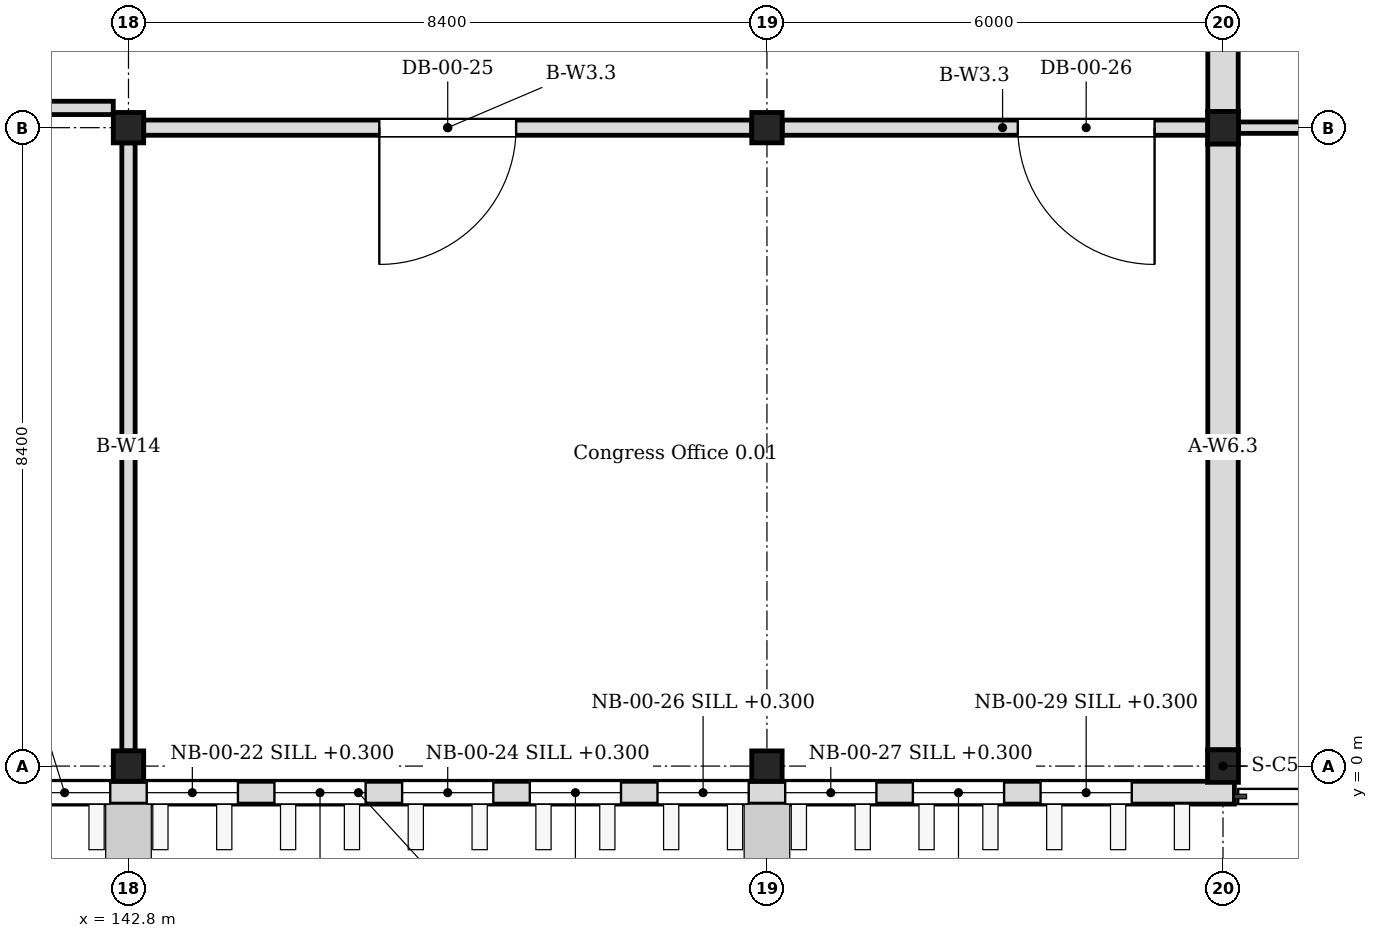
"""IFC4 building model, lengths in metres.
Left out: names, types, materials, properties, quantities, classifications, styles, units other than length and angle.
Written with IfcOpenShell. Run it as: python <this file> out.ifc"""

import sys

from ifc_helpers import new_model, si_unit, direction, frame, frame_2d, origin, origin_2d, place, context, subcontext, project, spatial, rectangle, i_section, extrude, element, fill, save


model = new_model("IFC4")
c1 = context("Model", 3, precision=1e-05, world=origin(), true_north=direction((0.0, 1.0)))
c2 = subcontext(c1, "Body", "Model", "MODEL_VIEW")
j1 = project(units=[si_unit("LENGTHUNIT", "METRE"), si_unit("PLANEANGLEUNIT", "RADIAN")], contexts=[c1])
p1 = place(None, origin())
s1 = spatial("IfcSite", under=j1, at=p1, CompositionType="ELEMENT")
p2 = place(p1, origin())
s2 = spatial("IfcBuilding", under=s1, at=p2, CompositionType="ELEMENT")
p3 = place(p2, origin())
s3 = spatial("IfcBuildingStorey", under=s2, at=p3, CompositionType="ELEMENT", Elevation=0.0)
for number, where, z_axis, x_axis in (
    (1, (157.2, 0.0, 0.0), (0.0, 0.0, 1.0), (1.0, 0.0, 0.0)),
    (2, (157.2, 8.4, 0.0), (0.0, 0.0, 1.0), (1.0, 0.0, 0.0)),
):
    element("IfcColumn", number, at=place(p3, frame(where, z_axis=z_axis, x_axis=x_axis)), inside=s3, PredefinedType="COLUMN", context=c2, shape_type="SweptSolid", body=[
        extrude(i_section(OverallWidth=0.407, OverallDepth=0.428, WebThickness=0.02, FlangeThickness=0.035, FilletRadius=0.022, at=origin_2d()), origin(), (0.0, 0.0, 1.0), 6.0),
    ])
for number, where, z_axis, x_axis in (
    (3, (142.8, 0.0, 0.0), (0.0, 0.0, 1.0), (1.0, 0.0, 0.0)),
    (4, (142.8, 8.4, 0.0), (0.0, 0.0, 1.0), (1.0, 0.0, 0.0)),
    (5, (151.2, 0.0, 0.0), (0.0, 0.0, 1.0), (1.0, 0.0, 0.0)),
    (6, (151.2, 8.4, 0.0), (0.0, 0.0, 1.0), (1.0, 0.0, 0.0)),
):
    element("IfcColumn", number, at=place(p3, frame(where, z_axis=z_axis, x_axis=x_axis)), inside=s3, PredefinedType="COLUMN", context=c2, shape_type="SweptSolid", body=[
        extrude(i_section(OverallWidth=0.4, OverallDepth=0.4, WebThickness=0.013, FlangeThickness=0.021, FilletRadius=0.022, at=origin_2d()), origin(), (0.0, 0.0, 1.0), 6.0),
    ])
p4 = place(p3, frame((134.3, -0.35, 0.0), z_axis=(0.0, 0.0, 1.0), x_axis=(1.0, 0.0, 0.0)))
e7 = element("IfcWall", 7, at=p4, inside=s3, PredefinedType="SOLIDWALL", context=c2, shape_type="SweptSolid", body=[
    extrude(rectangle(XDim=23.05, YDim=0.3, at=frame_2d((11.525, 0.0))), origin(), (0.0, 0.0, 1.0), 5.85),
])
p5 = place(p4, frame((0.34, 0.0, 0.3)))
e8 = element("IfcOpeningElement", 8, at=p5, cuts=e7, PredefinedType="OPENING", context=c2, shape_type="SweptSolid", body=[
    extrude(rectangle(XDim=1.2, YDim=4.2, at=frame_2d((0.6, 2.1))), frame((0.0, 0.16, 0.0), z_axis=(0.0, -1.0, 0.0), x_axis=(1.0, 0.0, 0.0)), (0.0, 0.0, 1.0), 0.32),
])
p6 = place(p4, frame((2.02, 0.0, 0.3)))
e9 = element("IfcOpeningElement", 9, at=p6, cuts=e7, PredefinedType="OPENING", context=c2, shape_type="SweptSolid", body=[
    extrude(rectangle(XDim=1.2, YDim=4.2, at=frame_2d((0.6, 2.1))), frame((0.0, 0.16, 0.0), z_axis=(0.0, -1.0, 0.0), x_axis=(1.0, 0.0, 0.0)), (0.0, 0.0, 1.0), 0.32),
])
p7 = place(p4, frame((3.7, 0.0, 0.3)))
e10 = element("IfcOpeningElement", 10, at=p7, cuts=e7, PredefinedType="OPENING", context=c2, shape_type="SweptSolid", body=[
    extrude(rectangle(XDim=1.2, YDim=4.2, at=frame_2d((0.6, 2.1))), frame((0.0, 0.16, 0.0), z_axis=(0.0, -1.0, 0.0), x_axis=(1.0, 0.0, 0.0)), (0.0, 0.0, 1.0), 0.32),
])
p8 = place(p4, frame((5.38, 0.0, 0.3)))
e11 = element("IfcOpeningElement", 11, at=p8, cuts=e7, PredefinedType="OPENING", context=c2, shape_type="SweptSolid", body=[
    extrude(rectangle(XDim=1.2, YDim=4.2, at=frame_2d((0.6, 2.1))), frame((0.0, 0.16, 0.0), z_axis=(0.0, -1.0, 0.0), x_axis=(1.0, 0.0, 0.0)), (0.0, 0.0, 1.0), 0.32),
])
p9 = place(p4, frame((7.06, 0.0, 0.3)))
e12 = element("IfcOpeningElement", 12, at=p9, cuts=e7, PredefinedType="OPENING", context=c2, shape_type="SweptSolid", body=[
    extrude(rectangle(XDim=1.2, YDim=4.2, at=frame_2d((0.6, 2.1))), frame((0.0, 0.16, 0.0), z_axis=(0.0, -1.0, 0.0), x_axis=(1.0, 0.0, 0.0)), (0.0, 0.0, 1.0), 0.32),
])
p10 = place(p4, frame((8.74, 0.0, 0.3)))
e13 = element("IfcOpeningElement", 13, at=p10, cuts=e7, PredefinedType="OPENING", context=c2, shape_type="SweptSolid", body=[
    extrude(rectangle(XDim=1.2, YDim=4.2, at=frame_2d((0.6, 2.1))), frame((0.0, 0.16, 0.0), z_axis=(0.0, -1.0, 0.0), x_axis=(1.0, 0.0, 0.0)), (0.0, 0.0, 1.0), 0.32),
])
p11 = place(p4, frame((10.42, 0.0, 0.3)))
e14 = element("IfcOpeningElement", 14, at=p11, cuts=e7, PredefinedType="OPENING", context=c2, shape_type="SweptSolid", body=[
    extrude(rectangle(XDim=1.2, YDim=4.2, at=frame_2d((0.6, 2.1))), frame((0.0, 0.16, 0.0), z_axis=(0.0, -1.0, 0.0), x_axis=(1.0, 0.0, 0.0)), (0.0, 0.0, 1.0), 0.32),
])
p12 = place(p4, frame((12.1, 0.0, 0.3)))
e15 = element("IfcOpeningElement", 15, at=p12, cuts=e7, PredefinedType="OPENING", context=c2, shape_type="SweptSolid", body=[
    extrude(rectangle(XDim=1.2, YDim=4.2, at=frame_2d((0.6, 2.1))), frame((0.0, 0.16, 0.0), z_axis=(0.0, -1.0, 0.0), x_axis=(1.0, 0.0, 0.0)), (0.0, 0.0, 1.0), 0.32),
])
p13 = place(p4, frame((13.78, 0.0, 0.3)))
e16 = element("IfcOpeningElement", 16, at=p13, cuts=e7, PredefinedType="OPENING", context=c2, shape_type="SweptSolid", body=[
    extrude(rectangle(XDim=1.2, YDim=4.2, at=frame_2d((0.6, 2.1))), frame((0.0, 0.16, 0.0), z_axis=(0.0, -1.0, 0.0), x_axis=(1.0, 0.0, 0.0)), (0.0, 0.0, 1.0), 0.32),
])
p14 = place(p4, frame((15.46, 0.0, 0.3)))
e17 = element("IfcOpeningElement", 17, at=p14, cuts=e7, PredefinedType="OPENING", context=c2, shape_type="SweptSolid", body=[
    extrude(rectangle(XDim=1.2, YDim=4.2, at=frame_2d((0.6, 2.1))), frame((0.0, 0.16, 0.0), z_axis=(0.0, -1.0, 0.0), x_axis=(1.0, 0.0, 0.0)), (0.0, 0.0, 1.0), 0.32),
])
p15 = place(p4, frame((17.14, 0.0, 0.3)))
e18 = element("IfcOpeningElement", 18, at=p15, cuts=e7, PredefinedType="OPENING", context=c2, shape_type="SweptSolid", body=[
    extrude(rectangle(XDim=1.2, YDim=4.2, at=frame_2d((0.6, 2.1))), frame((0.0, 0.16, 0.0), z_axis=(0.0, -1.0, 0.0), x_axis=(1.0, 0.0, 0.0)), (0.0, 0.0, 1.0), 0.32),
])
p16 = place(p4, frame((18.82, 0.0, 0.3)))
e19 = element("IfcOpeningElement", 19, at=p16, cuts=e7, PredefinedType="OPENING", context=c2, shape_type="SweptSolid", body=[
    extrude(rectangle(XDim=1.2, YDim=4.2, at=frame_2d((0.6, 2.1))), frame((0.0, 0.16, 0.0), z_axis=(0.0, -1.0, 0.0), x_axis=(1.0, 0.0, 0.0)), (0.0, 0.0, 1.0), 0.32),
])
p17 = place(p4, frame((20.5, 0.0, 0.3)))
e20 = element("IfcOpeningElement", 20, at=p17, cuts=e7, PredefinedType="OPENING", context=c2, shape_type="SweptSolid", body=[
    extrude(rectangle(XDim=1.2, YDim=4.2, at=frame_2d((0.6, 2.1))), frame((0.0, 0.16, 0.0), z_axis=(0.0, -1.0, 0.0), x_axis=(1.0, 0.0, 0.0)), (0.0, 0.0, 1.0), 0.32),
])
p18 = place(p3, frame((157.2, 0.214, 0.0), z_axis=(0.0, 0.0, 1.0), x_axis=(0.0, 1.0, 0.0)))
e21 = element("IfcWall", 21, at=p18, inside=s3, PredefinedType="SOLIDWALL", context=c2, shape_type="SweptSolid", body=[
    extrude(rectangle(XDim=7.972, YDim=0.4, at=frame_2d((3.986, 0.0))), origin(), (0.0, 0.0, 1.0), 9.45),
])
p19 = place(p3, frame((157.2, 8.614, 0.0), z_axis=(0.0, 0.0, 1.0), x_axis=(0.0, 1.0, 0.0)))
e22 = element("IfcWall", 22, at=p19, inside=s3, PredefinedType="SOLIDWALL", context=c2, shape_type="SweptSolid", body=[
    extrude(rectangle(XDim=7.972, YDim=0.4, at=frame_2d((3.986, 0.0))), origin(), (0.0, 0.0, 1.0), 7.24),
])
p20 = place(p19, frame((2.786, 0.0, 0.0)))
e23 = element("IfcOpeningElement", 23, at=p20, cuts=e22, PredefinedType="OPENING", context=c2, shape_type="SweptSolid", body=[
    extrude(rectangle(XDim=2.4, YDim=2.1, at=frame_2d((1.2, 1.05))), frame((0.0, 0.21, 0.0), z_axis=(0.0, -1.0, 0.0), x_axis=(1.0, 0.0, 0.0)), (0.0, 0.0, 1.0), 0.42),
])
p21 = place(p3, frame((157.404, 8.4, 0.0), z_axis=(0.0, 0.0, 1.0), x_axis=(1.0, 0.0, 0.0)))
e24 = element("IfcWall", 24, at=p21, inside=s3, PredefinedType="PARTITIONING", context=c2, shape_type="SweptSolid", body=[
    extrude(rectangle(XDim=10.396, YDim=0.15, at=frame_2d((5.198, 0.0))), origin(), (0.0, 0.0, 1.0), 9.604),
])
p22 = place(p21, frame((2.997, 0.0, 0.0)))
e25 = element("IfcOpeningElement", 25, at=p22, cuts=e24, PredefinedType="OPENING", context=c2, shape_type="SweptSolid", body=[
    extrude(rectangle(XDim=1.2, YDim=2.1, at=frame_2d((0.6, 1.05))), frame((0.0, 0.085, 0.0), z_axis=(0.0, -1.0, 0.0), x_axis=(1.0, 0.0, 0.0)), (0.0, 0.0, 1.0), 0.17),
])
p23 = place(p3, frame((134.6, 8.66, 0.0), z_axis=(0.0, 0.0, 1.0), x_axis=(1.0, 0.0, 0.0)))
e26 = element("IfcWall", 26, at=p23, inside=s3, PredefinedType="PARTITIONING", context=c2, shape_type="SweptSolid", body=[
    extrude(rectangle(XDim=8.0, YDim=0.175, at=frame_2d((4.0, 0.0))), origin(), (0.0, 0.0, 1.0), 5.05),
])
p24 = place(p23, frame((0.8, 0.0, 0.0)))
e27 = element("IfcOpeningElement", 27, at=p24, cuts=e26, PredefinedType="OPENING", context=c2, shape_type="SweptSolid", body=[
    extrude(rectangle(XDim=1.0, YDim=2.1, at=frame_2d((0.5, 1.05))), frame((0.0, 0.097, 0.0), z_axis=(0.0, -1.0, 0.0), x_axis=(1.0, 0.0, 0.0)), (0.0, 0.0, 1.0), 0.195),
])
p25 = place(p3, frame((143.0, 8.4, 0.0), z_axis=(0.0, 0.0, 1.0), x_axis=(1.0, 0.0, 0.0)))
e28 = element("IfcWall", 28, at=p25, inside=s3, PredefinedType="PARTITIONING", context=c2, shape_type="SweptSolid", body=[
    extrude(rectangle(XDim=8.0, YDim=0.2, at=frame_2d((4.0, 0.0))), origin(), (0.0, 0.0, 1.0), 5.05),
])
p26 = place(p25, frame((3.1, 0.0, 0.0)))
e29 = element("IfcOpeningElement", 29, at=p26, cuts=e28, PredefinedType="OPENING", context=c2, shape_type="SweptSolid", body=[
    extrude(rectangle(XDim=1.8, YDim=2.1, at=frame_2d((0.9, 1.05))), frame((0.0, 0.11, 0.0), z_axis=(0.0, -1.0, 0.0), x_axis=(1.0, 0.0, 0.0)), (0.0, 0.0, 1.0), 0.22),
])
p27 = place(p3, frame((151.4, 8.4, 0.0), z_axis=(0.0, 0.0, 1.0), x_axis=(1.0, 0.0, 0.0)))
e30 = element("IfcWall", 30, at=p27, inside=s3, PredefinedType="PARTITIONING", context=c2, shape_type="SweptSolid", body=[
    extrude(rectangle(XDim=5.8, YDim=0.2, at=frame_2d((2.9, 0.0))), origin(), (0.0, 0.0, 1.0), 5.05),
])
p28 = place(p27, frame((3.1, 0.0, 0.0)))
e31 = element("IfcOpeningElement", 31, at=p28, cuts=e30, PredefinedType="OPENING", context=c2, shape_type="SweptSolid", body=[
    extrude(rectangle(XDim=1.8, YDim=2.1, at=frame_2d((0.9, 1.05))), frame((0.0, 0.11, 0.0), z_axis=(0.0, -1.0, 0.0), x_axis=(1.0, 0.0, 0.0)), (0.0, 0.0, 1.0), 0.22),
])
p29 = place(p3, frame((142.8, 0.2, 0.0), z_axis=(0.0, 0.0, 1.0), x_axis=(0.0, 1.0, 0.0)))
e32 = element("IfcWall", 32, at=p29, inside=s3, PredefinedType="PARTITIONING", context=c2, shape_type="SweptSolid", body=[
    extrude(rectangle(XDim=8.0, YDim=0.175, at=frame_2d((4.0, 0.0))), origin(), (0.0, 0.0, 1.0), 5.05),
])
p30 = place(p9, origin())
e33 = element("IfcWindow", 33, at=p30, inside=s3, PartitioningType="TRIPLE_PANEL_VERTICAL", PredefinedType="WINDOW", context=c2, shape_type="SweptSolid", body=[
    extrude(rectangle(XDim=1.2, YDim=4.2, at=frame_2d((0.6, 2.1))), frame((0.0, 0.03, 0.0), z_axis=(0.0, -1.0, 0.0), x_axis=(1.0, 0.0, 0.0)), (0.0, 0.0, 1.0), 0.06),
])
fill(e12, e33)
p31 = place(p10, origin())
e34 = element("IfcWindow", 34, at=p31, inside=s3, PartitioningType="TRIPLE_PANEL_VERTICAL", PredefinedType="WINDOW", context=c2, shape_type="SweptSolid", body=[
    extrude(rectangle(XDim=1.2, YDim=4.2, at=frame_2d((0.6, 2.1))), frame((0.0, 0.03, 0.0), z_axis=(0.0, -1.0, 0.0), x_axis=(1.0, 0.0, 0.0)), (0.0, 0.0, 1.0), 0.06),
])
fill(e13, e34)
p32 = place(p11, origin())
e35 = element("IfcWindow", 35, at=p32, inside=s3, PartitioningType="TRIPLE_PANEL_VERTICAL", PredefinedType="WINDOW", context=c2, shape_type="SweptSolid", body=[
    extrude(rectangle(XDim=1.2, YDim=4.2, at=frame_2d((0.6, 2.1))), frame((0.0, 0.03, 0.0), z_axis=(0.0, -1.0, 0.0), x_axis=(1.0, 0.0, 0.0)), (0.0, 0.0, 1.0), 0.06),
])
fill(e14, e35)
p33 = place(p12, origin())
e36 = element("IfcWindow", 36, at=p33, inside=s3, PartitioningType="TRIPLE_PANEL_VERTICAL", PredefinedType="WINDOW", context=c2, shape_type="SweptSolid", body=[
    extrude(rectangle(XDim=1.2, YDim=4.2, at=frame_2d((0.6, 2.1))), frame((0.0, 0.03, 0.0), z_axis=(0.0, -1.0, 0.0), x_axis=(1.0, 0.0, 0.0)), (0.0, 0.0, 1.0), 0.06),
])
fill(e15, e36)
p34 = place(p13, origin())
e37 = element("IfcWindow", 37, at=p34, inside=s3, PartitioningType="TRIPLE_PANEL_VERTICAL", PredefinedType="WINDOW", context=c2, shape_type="SweptSolid", body=[
    extrude(rectangle(XDim=1.2, YDim=4.2, at=frame_2d((0.6, 2.1))), frame((0.0, 0.03, 0.0), z_axis=(0.0, -1.0, 0.0), x_axis=(1.0, 0.0, 0.0)), (0.0, 0.0, 1.0), 0.06),
])
fill(e16, e37)
p35 = place(p14, origin())
e38 = element("IfcWindow", 38, at=p35, inside=s3, PartitioningType="TRIPLE_PANEL_VERTICAL", PredefinedType="WINDOW", context=c2, shape_type="SweptSolid", body=[
    extrude(rectangle(XDim=1.2, YDim=4.2, at=frame_2d((0.6, 2.1))), frame((0.0, 0.03, 0.0), z_axis=(0.0, -1.0, 0.0), x_axis=(1.0, 0.0, 0.0)), (0.0, 0.0, 1.0), 0.06),
])
fill(e17, e38)
p36 = place(p15, origin())
e39 = element("IfcWindow", 39, at=p36, inside=s3, PartitioningType="TRIPLE_PANEL_VERTICAL", PredefinedType="WINDOW", context=c2, shape_type="SweptSolid", body=[
    extrude(rectangle(XDim=1.2, YDim=4.2, at=frame_2d((0.6, 2.1))), frame((0.0, 0.03, 0.0), z_axis=(0.0, -1.0, 0.0), x_axis=(1.0, 0.0, 0.0)), (0.0, 0.0, 1.0), 0.06),
])
fill(e18, e39)
p37 = place(p16, origin())
e40 = element("IfcWindow", 40, at=p37, inside=s3, PartitioningType="TRIPLE_PANEL_VERTICAL", PredefinedType="WINDOW", context=c2, shape_type="SweptSolid", body=[
    extrude(rectangle(XDim=1.2, YDim=4.2, at=frame_2d((0.6, 2.1))), frame((0.0, 0.03, 0.0), z_axis=(0.0, -1.0, 0.0), x_axis=(1.0, 0.0, 0.0)), (0.0, 0.0, 1.0), 0.06),
])
fill(e19, e40)
p38 = place(p17, origin())
e41 = element("IfcWindow", 41, at=p38, inside=s3, PartitioningType="TRIPLE_PANEL_VERTICAL", PredefinedType="WINDOW", context=c2, shape_type="SweptSolid", body=[
    extrude(rectangle(XDim=1.2, YDim=4.2, at=frame_2d((0.6, 2.1))), frame((0.0, 0.03, 0.0), z_axis=(0.0, -1.0, 0.0), x_axis=(1.0, 0.0, 0.0)), (0.0, 0.0, 1.0), 0.06),
])
fill(e20, e41)
p39 = place(p26, origin())
e42 = element("IfcDoor", 42, at=p39, inside=s3, OperationType="DOUBLE_DOOR_SINGLE_SWING", PredefinedType="DOOR", context=c2, shape_type="SweptSolid", body=[
    extrude(rectangle(XDim=1.8, YDim=2.1, at=frame_2d((0.9, 1.05))), frame((0.0, 0.025, 0.0), z_axis=(0.0, -1.0, 0.0), x_axis=(1.0, 0.0, 0.0)), (0.0, 0.0, 1.0), 0.05),
])
fill(e29, e42)
p40 = place(p28, origin())
e43 = element("IfcDoor", 43, at=p40, inside=s3, OperationType="DOUBLE_DOOR_SINGLE_SWING", PredefinedType="DOOR", context=c2, shape_type="SweptSolid", body=[
    extrude(rectangle(XDim=1.8, YDim=2.1, at=frame_2d((0.9, 1.05))), frame((0.0, 0.025, 0.0), z_axis=(0.0, -1.0, 0.0), x_axis=(1.0, 0.0, 0.0)), (0.0, 0.0, 1.0), 0.05),
])
fill(e31, e43)
save(model, sys.argv[1])
